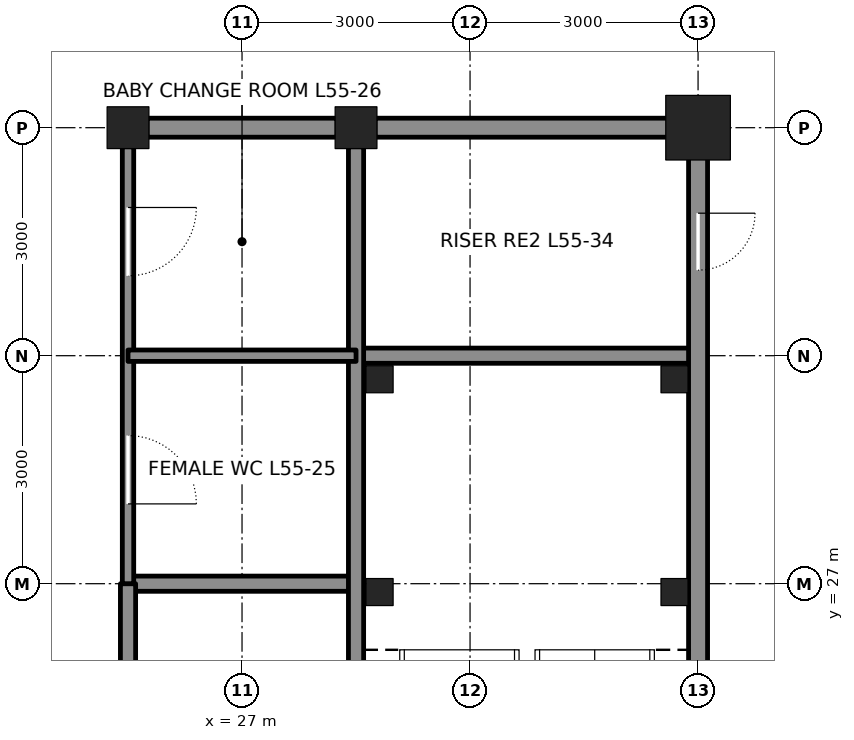
"""IFC4 building model, lengths in metres.
Left out: names, types, materials, properties, quantities, classifications, styles, units other than length and angle.
Written with IfcOpenShell. Run it as: python <this file> out.ifc"""

import sys

from ifc_helpers import new_model, si_unit, direction, frame, frame_2d, origin, origin_2d, place, context, subcontext, project, spatial, rectangle, hollow_rectangle, extrude, element, fill, save


model = new_model("IFC4")
c1 = context("Model", 3, precision=1e-05, world=origin(), true_north=direction((0.0, 1.0)))
c2 = subcontext(c1, "Body", "Model", "MODEL_VIEW")
j1 = project(units=[si_unit("LENGTHUNIT", "METRE"), si_unit("PLANEANGLEUNIT", "RADIAN")], contexts=[c1])
p1 = place(None, origin())
s1 = spatial("IfcSite", under=j1, at=p1, CompositionType="ELEMENT")
p2 = place(p1, origin())
s2 = spatial("IfcBuilding", under=s1, at=p2, CompositionType="ELEMENT")
p3 = place(p2, frame((0.0, 0.0, 247.5)))
s3 = spatial("IfcBuildingStorey", under=s2, at=p3, CompositionType="ELEMENT", Elevation=247.5)
for number, where, z_axis, x_axis in (
    (1, (25.5, 33.0, 0.0), (0.0, 0.0, 1.0), (1.0, 0.0, 0.0)),
    (2, (28.5, 33.0, 0.0), (0.0, 0.0, 1.0), (1.0, 0.0, 0.0)),
):
    element("IfcColumn", number, at=place(p3, frame(where, z_axis=z_axis, x_axis=x_axis)), inside=s3, PredefinedType="COLUMN", context=c2, shape_type="SweptSolid", body=[
        extrude(hollow_rectangle(XDim=0.55, YDim=0.55, WallThickness=0.045, at=origin_2d()), origin(), (0.0, 0.0, 1.0), 4.2),
    ])
p4 = place(p3, frame((33.0, 33.0, 0.0), z_axis=(0.0, 0.0, 1.0), x_axis=(1.0, 0.0, 0.0)))
e3 = element("IfcColumn", 3, at=p4, inside=s3, PredefinedType="COLUMN", context=c2, shape_type="SweptSolid", body=[
    extrude(hollow_rectangle(XDim=0.85, YDim=0.85, WallThickness=0.085, at=origin_2d()), origin(), (0.0, 0.0, 1.0), 4.2),
])
p5 = place(p3, frame((25.5, 27.0, 0.0), z_axis=(0.0, 0.0, 1.0), x_axis=(1.0, 0.0, 0.0)))
e4 = element("IfcWall", 4, at=p5, inside=s3, PredefinedType="SOLIDWALL", context=c2, shape_type="SweptSolid", body=[
    extrude(rectangle(XDim=3.0, YDim=0.2, at=frame_2d((1.5, 0.0))), origin(), (0.0, 0.0, 1.0), 4.04),
])
p6 = place(p3, frame((28.5, 30.0, 0.0), z_axis=(0.0, 0.0, 1.0), x_axis=(1.0, 0.0, 0.0)))
e5 = element("IfcWall", 5, at=p6, inside=s3, PredefinedType="SOLIDWALL", context=c2, shape_type="SweptSolid", body=[
    extrude(rectangle(XDim=4.5, YDim=0.2, at=frame_2d((2.25, 0.0))), origin(), (0.0, 0.0, 1.0), 4.04),
])
p7 = place(p3, frame((25.75, 33.0, 0.0), z_axis=(0.0, 0.0, 1.0), x_axis=(1.0, 0.0, 0.0)))
e6 = element("IfcWall", 6, at=p7, inside=s3, PredefinedType="SOLIDWALL", context=c2, shape_type="SweptSolid", body=[
    extrude(rectangle(XDim=2.5, YDim=0.25, at=frame_2d((1.25, 0.0))), origin(), (0.0, 0.0, 1.0), 3.181),
])
p8 = place(p3, frame((28.75, 33.0, 0.0), z_axis=(0.0, 0.0, 1.0), x_axis=(1.0, 0.0, 0.0)))
e7 = element("IfcWall", 7, at=p8, inside=s3, PredefinedType="SOLIDWALL", context=c2, shape_type="SweptSolid", body=[
    extrude(rectangle(XDim=4.0, YDim=0.25, at=frame_2d((2.0, 0.0))), origin(), (0.0, 0.0, 1.0), 3.181),
])
p9 = place(p3, frame((25.5, 15.0, 0.0), z_axis=(0.0, 0.0, 1.0), x_axis=(0.0, 1.0, 0.0)))
e8 = element("IfcWall", 8, at=p9, inside=s3, PredefinedType="SOLIDWALL", context=c2, shape_type="SweptSolid", body=[
    extrude(rectangle(XDim=12.0, YDim=0.2, at=frame_2d((6.0, 0.0))), origin(), (0.0, 0.0, 1.0), 3.065),
])
p10 = place(p3, frame((25.5, 27.0, 0.0), z_axis=(0.0, 0.0, 1.0), x_axis=(0.0, 1.0, 0.0)))
e9 = element("IfcWall", 9, at=p10, inside=s3, PredefinedType="PARTITIONING", context=c2, shape_type="SweptSolid", body=[
    extrude(rectangle(XDim=5.75, YDim=0.15, at=frame_2d((2.875, 0.0))), origin(), (0.0, 0.0, 1.0), 3.065),
])
p11 = place(p10, frame((1.05, 0.0, 0.0)))
e10 = element("IfcOpeningElement", 10, at=p11, cuts=e9, PredefinedType="OPENING", context=c2, shape_type="SweptSolid", body=[
    extrude(rectangle(XDim=0.9, YDim=2.1, at=frame_2d((0.45, 1.05))), frame((0.0, 0.085, 0.0), z_axis=(0.0, -1.0, 0.0), x_axis=(1.0, 0.0, 0.0)), (0.0, 0.0, 1.0), 0.17),
])
p12 = place(p10, frame((4.05, 0.0, 0.0)))
e11 = element("IfcOpeningElement", 11, at=p12, cuts=e9, PredefinedType="OPENING", context=c2, shape_type="SweptSolid", body=[
    extrude(rectangle(XDim=0.9, YDim=2.1, at=frame_2d((0.45, 1.05))), frame((0.0, 0.085, 0.0), z_axis=(0.0, -1.0, 0.0), x_axis=(1.0, 0.0, 0.0)), (0.0, 0.0, 1.0), 0.17),
])
p13 = place(p3, frame((28.5, 24.25, 0.0), z_axis=(0.0, 0.0, 1.0), x_axis=(0.0, 1.0, 0.0)))
e12 = element("IfcWall", 12, at=p13, inside=s3, PredefinedType="SOLIDWALL", context=c2, shape_type="SweptSolid", body=[
    extrude(rectangle(XDim=8.5, YDim=0.2, at=frame_2d((4.25, 0.0))), origin(), (0.0, 0.0, 1.0), 3.113),
])
p14 = place(p3, frame((33.0, 24.25, 0.0), z_axis=(0.0, 0.0, 1.0), x_axis=(0.0, 1.0, 0.0)))
e13 = element("IfcWall", 13, at=p14, inside=s3, PredefinedType="SOLIDWALL", context=c2, shape_type="SweptSolid", body=[
    extrude(rectangle(XDim=8.5, YDim=0.25, at=frame_2d((4.25, 0.0))), origin(), (0.0, 0.0, 1.0), 3.113),
])
p15 = place(p14, frame((6.875, 0.0, 0.0)))
e14 = element("IfcOpeningElement", 14, at=p15, cuts=e13, PredefinedType="OPENING", context=c2, shape_type="SweptSolid", body=[
    extrude(rectangle(XDim=0.75, YDim=2.1, at=frame_2d((0.375, 1.05))), frame((0.0, 0.135, 0.0), z_axis=(0.0, -1.0, 0.0), x_axis=(1.0, 0.0, 0.0)), (0.0, 0.0, 1.0), 0.27),
])
p16 = place(p3, frame((25.5, 30.0, 0.0), z_axis=(0.0, 0.0, 1.0), x_axis=(1.0, 0.0, 0.0)))
e15 = element("IfcWall", 15, at=p16, inside=s3, PredefinedType="PARTITIONING", context=c2, shape_type="SweptSolid", body=[
    extrude(rectangle(XDim=3.0, YDim=0.15, at=frame_2d((1.5, 0.0))), origin(), (0.0, 0.0, 1.0), 4.04),
])
for number, where, z_axis, x_axis in (
    (16, (28.81, 29.69, 0.0), (0.0, 0.0, 1.0), (1.0, 0.0, 0.0)),
    (17, (32.69, 29.69, 0.0), (0.0, 0.0, 1.0), (1.0, 0.0, 0.0)),
    (18, (28.81, 26.89, 0.0), (0.0, 0.0, 1.0), (1.0, 0.0, 0.0)),
    (19, (32.69, 26.89, 0.0), (0.0, 0.0, 1.0), (1.0, 0.0, 0.0)),
):
    element("IfcColumn", number, at=place(p3, frame(where, z_axis=z_axis, x_axis=x_axis)), inside=s3, PredefinedType="COLUMN", context=c2, shape_type="SweptSolid", body=[
        extrude(hollow_rectangle(XDim=0.356, YDim=0.356, WallThickness=0.009, at=origin_2d()), origin(), (0.0, 0.0, 1.0), 4.2),
    ])
p17 = place(p15, frame((0.75, 0.0, 0.0), z_axis=(0.0, 0.0, 1.0), x_axis=(-1.0, 0.0, 0.0)))
e20 = element("IfcDoor", 20, at=p17, inside=s3, OperationType="SINGLE_SWING_LEFT", PredefinedType="DOOR", context=c2, shape_type="SweptSolid", body=[
    extrude(rectangle(XDim=0.75, YDim=2.1, at=frame_2d((0.375, 1.05))), frame((0.0, 0.025, 0.0), z_axis=(0.0, -1.0, 0.0), x_axis=(1.0, 0.0, 0.0)), (0.0, 0.0, 1.0), 0.05),
])
fill(e14, e20)
p18 = place(p11, frame((0.9, 0.0, 0.0), z_axis=(0.0, 0.0, 1.0), x_axis=(-1.0, 0.0, 0.0)))
e21 = element("IfcDoor", 21, at=p18, inside=s3, OperationType="SINGLE_SWING_RIGHT", PredefinedType="DOOR", context=c2, shape_type="SweptSolid", body=[
    extrude(rectangle(XDim=0.9, YDim=2.1, at=frame_2d((0.45, 1.05))), frame((0.0, 0.025, 0.0), z_axis=(0.0, -1.0, 0.0), x_axis=(1.0, 0.0, 0.0)), (0.0, 0.0, 1.0), 0.05),
])
fill(e10, e21)
p19 = place(p12, frame((0.9, 0.0, 0.0), z_axis=(0.0, 0.0, 1.0), x_axis=(-1.0, 0.0, 0.0)))
e22 = element("IfcDoor", 22, at=p19, inside=s3, OperationType="SINGLE_SWING_LEFT", PredefinedType="DOOR", context=c2, shape_type="SweptSolid", body=[
    extrude(rectangle(XDim=0.9, YDim=2.1, at=frame_2d((0.45, 1.05))), frame((0.0, 0.025, 0.0), z_axis=(0.0, -1.0, 0.0), x_axis=(1.0, 0.0, 0.0)), (0.0, 0.0, 1.0), 0.05),
])
fill(e11, e22)
save(model, sys.argv[1])
